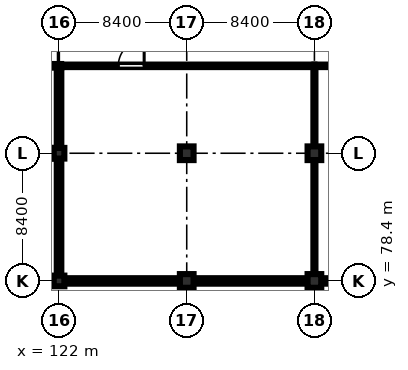
"""IFC4 building model, lengths in metres.
Left out: names, types, materials, properties, quantities, classifications, styles, units other than length and angle.
Written with IfcOpenShell. Run it as: python <this file> out.ifc"""

import sys

from ifc_helpers import new_model, si_unit, direction, frame, frame_2d, origin, origin_2d, place, context, subcontext, project, spatial, rectangle, extrude, element, fill, save


model = new_model("IFC4")
c1 = context("Model", 3, precision=1e-05, world=origin(), true_north=direction((0.0, 1.0)))
c2 = subcontext(c1, "Body", "Model", "MODEL_VIEW")
j1 = project(units=[si_unit("LENGTHUNIT", "METRE"), si_unit("PLANEANGLEUNIT", "RADIAN")], contexts=[c1])
p1 = place(None, origin())
s1 = spatial("IfcSite", under=j1, at=p1, CompositionType="ELEMENT")
p2 = place(p1, origin())
s2 = spatial("IfcBuilding", under=s1, at=p2, CompositionType="ELEMENT")
p3 = place(p2, frame((0.0, 0.0, 10.2)))
s3 = spatial("IfcBuildingStorey", under=s2, at=p3, CompositionType="ELEMENT", Elevation=10.2)
for number, where, z_axis, x_axis in (
    (1, (122.0, 78.4, 0.0), (0.0, 0.0, 1.0), (1.0, 0.0, 0.0)),
    (2, (122.0, 86.8, 0.0), (0.0, 0.0, 1.0), (1.0, 0.0, 0.0)),
):
    element("IfcColumn", number, at=place(p3, frame(where, z_axis=z_axis, x_axis=x_axis)), inside=s3, PredefinedType="COLUMN", context=c2, shape_type="SweptSolid", body=[
        extrude(rectangle(XDim=0.7, YDim=0.7, at=origin_2d()), origin(), (0.0, 0.0, 1.0), 4.26),
    ])
for number, where, z_axis, x_axis in (
    (3, (130.4, 78.4, 0.0), (0.0, 0.0, 1.0), (1.0, 0.0, 0.0)),
    (4, (130.4, 86.8, 0.0), (0.0, 0.0, 1.0), (1.0, 0.0, 0.0)),
    (5, (138.8, 78.4, 0.0), (0.0, 0.0, 1.0), (1.0, 0.0, 0.0)),
    (6, (138.8, 86.8, 0.0), (0.0, 0.0, 1.0), (1.0, 0.0, 0.0)),
):
    element("IfcColumn", number, at=place(p3, frame(where, z_axis=z_axis, x_axis=x_axis)), inside=s3, PredefinedType="COLUMN", context=c2, shape_type="SweptSolid", body=[
        extrude(rectangle(XDim=0.9, YDim=0.9, at=origin_2d()), origin(), (0.0, 0.0, 1.0), 4.26),
    ])
p4 = place(p3, frame((129.95, 78.4, 0.0), z_axis=(0.0, 0.0, 1.0), x_axis=(-1.0, 0.0, 0.0)))
e7 = element("IfcWall", 7, at=p4, inside=s3, PredefinedType="STANDARD", context=c2, shape_type="SweptSolid", body=[
    extrude(rectangle(XDim=7.6, YDim=0.36, at=frame_2d((3.8, 0.0))), origin(), (0.0, 0.0, 1.0), 3.51),
])
p5 = place(p4, frame((1.15, 0.0, 0.95)))
e8 = element("IfcOpeningElement", 8, at=p5, cuts=e7, PredefinedType="OPENING", context=c2, shape_type="SweptSolid", body=[
    extrude(rectangle(XDim=1.5, YDim=1.5, at=frame_2d((0.75, 0.75))), frame((0.0, 0.19, 0.0), z_axis=(0.0, -1.0, 0.0), x_axis=(1.0, 0.0, 0.0)), (0.0, 0.0, 1.0), 0.38),
])
p6 = place(p3, frame((138.35, 78.4, 0.0), z_axis=(0.0, 0.0, 1.0), x_axis=(-1.0, 0.0, 0.0)))
e9 = element("IfcWall", 9, at=p6, inside=s3, PredefinedType="STANDARD", context=c2, shape_type="SweptSolid", body=[
    extrude(rectangle(XDim=7.5, YDim=0.36, at=frame_2d((3.75, 0.0))), origin(), (0.0, 0.0, 1.0), 3.16),
])
p7 = place(p6, frame((1.15, 0.0, 0.95)))
e10 = element("IfcOpeningElement", 10, at=p7, cuts=e9, PredefinedType="OPENING", context=c2, shape_type="SweptSolid", body=[
    extrude(rectangle(XDim=1.5, YDim=1.5, at=frame_2d((0.75, 0.75))), frame((0.0, 0.19, 0.0), z_axis=(0.0, -1.0, 0.0), x_axis=(1.0, 0.0, 0.0)), (0.0, 0.0, 1.0), 0.38),
])
p8 = place(p3, frame((146.75, 78.4, 0.0), z_axis=(0.0, 0.0, 1.0), x_axis=(-1.0, 0.0, 0.0)))
e11 = element("IfcWall", 11, at=p8, inside=s3, PredefinedType="STANDARD", context=c2, shape_type="SweptSolid", body=[
    extrude(rectangle(XDim=7.5, YDim=0.36, at=frame_2d((3.75, 0.0))), origin(), (0.0, 0.0, 1.0), 3.16),
])
p9 = place(p8, frame((1.15, 0.0, 0.95)))
e12 = element("IfcOpeningElement", 12, at=p9, cuts=e11, PredefinedType="OPENING", context=c2, shape_type="SweptSolid", body=[
    extrude(rectangle(XDim=1.5, YDim=1.5, at=frame_2d((0.75, 0.75))), frame((0.0, 0.19, 0.0), z_axis=(0.0, -1.0, 0.0), x_axis=(1.0, 0.0, 0.0)), (0.0, 0.0, 1.0), 0.38),
])
p10 = place(p3, frame((122.0, 78.75, 0.0), z_axis=(0.0, 0.0, 1.0), x_axis=(0.0, 1.0, 0.0)))
e13 = element("IfcWall", 13, at=p10, inside=s3, PredefinedType="STANDARD", context=c2, shape_type="SweptSolid", body=[
    extrude(rectangle(XDim=7.7, YDim=0.3, at=frame_2d((3.85, 0.0))), origin(), (0.0, 0.0, 1.0), 3.51),
])
p11 = place(p3, frame((122.0, 87.15, 0.0), z_axis=(0.0, 0.0, 1.0), x_axis=(0.0, 1.0, 0.0)))
e14 = element("IfcWall", 14, at=p11, inside=s3, PredefinedType="STANDARD", context=c2, shape_type="SweptSolid", body=[
    extrude(rectangle(XDim=5.27, YDim=0.3, at=frame_2d((2.635, 0.0))), origin(), (0.0, 0.0, 1.0), 3.51),
])
p12 = place(p3, frame((122.14, 92.55, 0.0), z_axis=(0.0, 0.0, 1.0), x_axis=(-1.0, 0.0, 0.0)))
e15 = element("IfcWall", 15, at=p12, inside=s3, PredefinedType="STANDARD", context=c2, shape_type="SweptSolid", body=[
    extrude(rectangle(XDim=1.11, YDim=0.24, at=frame_2d((0.555, 0.0))), origin(), (0.0, 0.0, 1.0), 4.26),
])
p13 = place(p3, frame((122.15, 92.55, 0.0), z_axis=(0.0, 0.0, 1.0), x_axis=(1.0, 0.0, 0.0)))
e16 = element("IfcWall", 16, at=p13, inside=s3, PredefinedType="PARTITIONING", context=c2, shape_type="SweptSolid", body=[
    extrude(rectangle(XDim=16.65, YDim=0.165, at=frame_2d((8.325, 0.0))), origin(), (0.0, 0.0, 1.0), 4.26),
])
p14 = place(p13, frame((3.75, 0.0, 0.0)))
e17 = element("IfcOpeningElement", 17, at=p14, cuts=e16, PredefinedType="OPENING", context=c2, shape_type="SweptSolid", body=[
    extrude(rectangle(XDim=1.7, YDim=2.2, at=frame_2d((0.85, 1.1))), frame((0.0, 0.093, 0.0), z_axis=(0.0, -1.0, 0.0), x_axis=(1.0, 0.0, 0.0)), (0.0, 0.0, 1.0), 0.185),
])
p15 = place(p3, frame((138.8, 92.55, 0.0), z_axis=(0.0, 0.0, 1.0), x_axis=(1.0, 0.0, 0.0)))
e18 = element("IfcWall", 18, at=p15, inside=s3, PredefinedType="PARTITIONING", context=c2, shape_type="SweptSolid", body=[
    extrude(rectangle(XDim=12.6, YDim=0.165, at=frame_2d((6.3, 0.0))), origin(), (0.0, 0.0, 1.0), 4.26),
])
p16 = place(p15, frame((3.4, 0.0, 0.0)))
e19 = element("IfcOpeningElement", 19, at=p16, cuts=e18, PredefinedType="OPENING", context=c2, shape_type="SweptSolid", body=[
    extrude(rectangle(XDim=1.02, YDim=2.15, at=frame_2d((0.51, 1.075))), frame((0.0, 0.093, 0.0), z_axis=(0.0, -1.0, 0.0), x_axis=(1.0, 0.0, 0.0)), (0.0, 0.0, 1.0), 0.185),
])
p17 = place(p3, frame((138.8, 78.55, 0.0), z_axis=(0.0, 0.0, 1.0), x_axis=(0.0, 1.0, 0.0)))
e20 = element("IfcWall", 20, at=p17, inside=s3, PredefinedType="PARTITIONING", context=c2, shape_type="SweptSolid", body=[
    extrude(rectangle(XDim=14.0, YDim=0.135, at=frame_2d((7.0, 0.0))), origin(), (0.0, 0.0, 1.0), 3.51),
])
p18 = place(p5, origin())
e21 = element("IfcWindow", 21, at=p18, inside=s3, PartitioningType="DOUBLE_PANEL_VERTICAL", PredefinedType="WINDOW", context=c2, shape_type="SweptSolid", body=[
    extrude(rectangle(XDim=1.5, YDim=1.5, at=frame_2d((0.75, 0.75))), frame((0.0, 0.03, 0.0), z_axis=(0.0, -1.0, 0.0), x_axis=(1.0, 0.0, 0.0)), (0.0, 0.0, 1.0), 0.06),
])
fill(e8, e21)
p19 = place(p7, origin())
e22 = element("IfcWindow", 22, at=p19, inside=s3, PartitioningType="DOUBLE_PANEL_VERTICAL", PredefinedType="WINDOW", context=c2, shape_type="SweptSolid", body=[
    extrude(rectangle(XDim=1.5, YDim=1.5, at=frame_2d((0.75, 0.75))), frame((0.0, 0.03, 0.0), z_axis=(0.0, -1.0, 0.0), x_axis=(1.0, 0.0, 0.0)), (0.0, 0.0, 1.0), 0.06),
])
fill(e10, e22)
p20 = place(p14, origin())
e23 = element("IfcDoor", 23, at=p20, inside=s3, OperationType="SINGLE_SWING_RIGHT", PredefinedType="DOOR", context=c2, shape_type="SweptSolid", body=[
    extrude(rectangle(XDim=1.7, YDim=2.2, at=frame_2d((0.85, 1.1))), frame((0.0, 0.025, 0.0), z_axis=(0.0, -1.0, 0.0), x_axis=(1.0, 0.0, 0.0)), (0.0, 0.0, 1.0), 0.05),
])
fill(e17, e23)
save(model, sys.argv[1])
